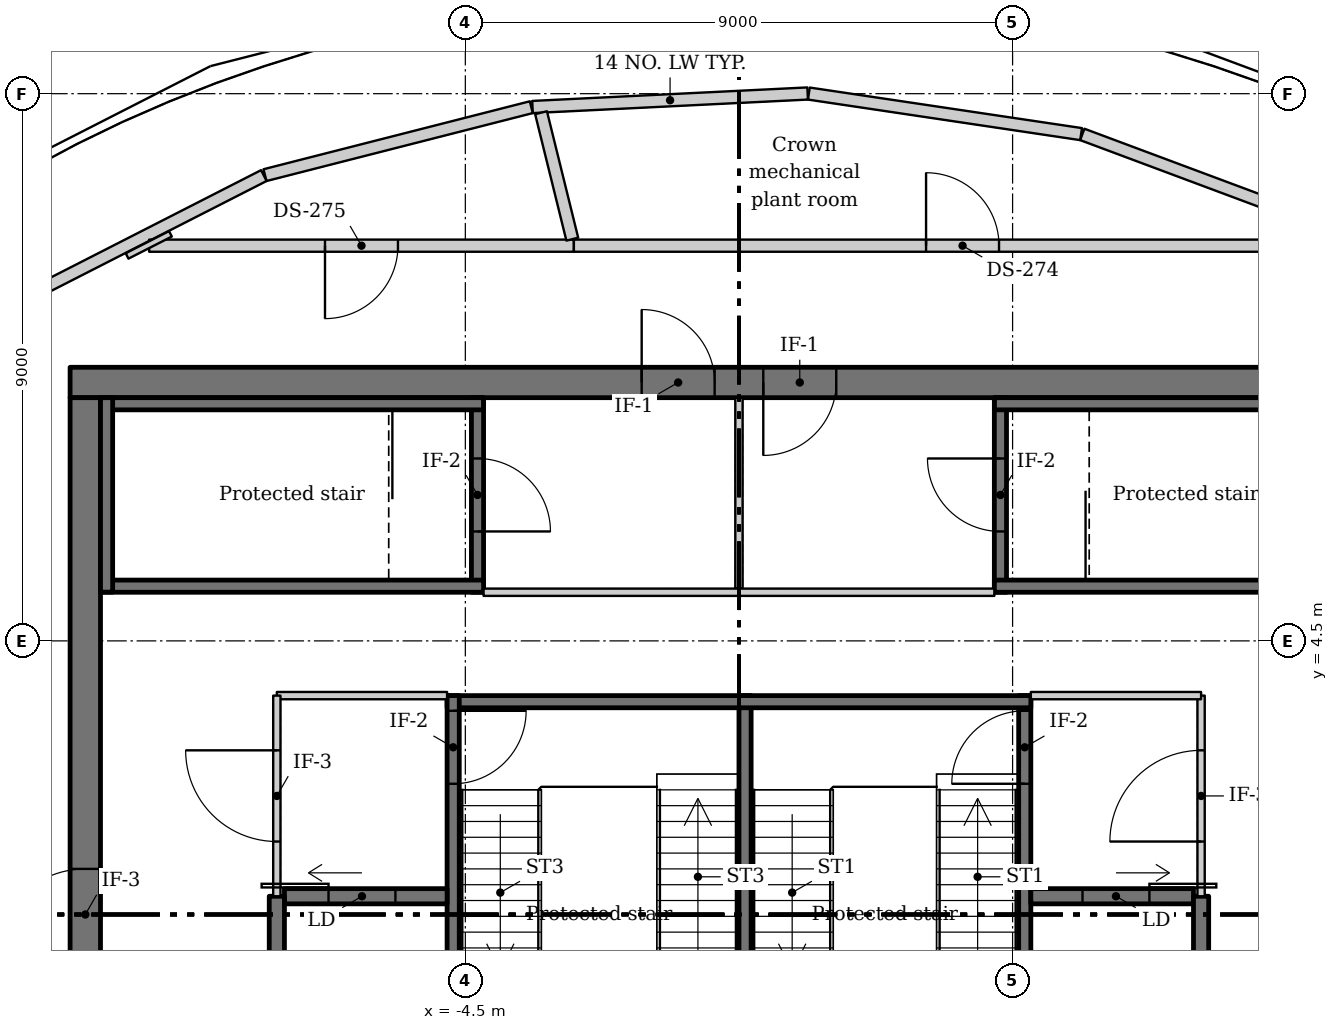
"""IFC4 building model, lengths in metres.
Left out: names, types, materials, properties, quantities, classifications, styles, units other than length and angle.
Written with IfcOpenShell. Run it as: python <this file> out.ifc"""

import sys

from ifc_helpers import new_model, si_unit, direction, frame, frame_2d, origin, place, context, subcontext, project, spatial, rectangle, extrude, source, transform, mapped, element, fill, save


model = new_model("IFC4")
c1 = context("Model", 3, precision=1e-05, world=origin(), true_north=direction((0.0, 1.0)))
c2 = subcontext(c1, "Body", "Model", "MODEL_VIEW")
j1 = project(units=[si_unit("LENGTHUNIT", "METRE"), si_unit("PLANEANGLEUNIT", "RADIAN")], contexts=[c1])
p1 = place(None, origin())
s1 = spatial("IfcSite", under=j1, at=p1, CompositionType="ELEMENT")
p2 = place(p1, origin())
s2 = spatial("IfcBuilding", under=s1, at=p2, CompositionType="ELEMENT")
p3 = place(p2, frame((0.0, 0.0, 352.0)))
s3 = spatial("IfcBuildingStorey", under=s2, at=p3, CompositionType="ELEMENT", Elevation=352.0)
m1 = source(origin(), c2, "Body", "SweptSolid", [
    extrude(rectangle(XDim=22.0, YDim=0.5, at=frame_2d((11.0, 0.0))), origin(), (0.0, 0.0, 1.0), 4.25),
])
p4 = place(p3, frame((-11.0, 8.75, -0.25), z_axis=(0.0, 0.0, 1.0), x_axis=(1.0, 0.0, 0.0)))
e1 = element("IfcWall", 1, at=p4, inside=s3, PredefinedType="SHEAR", context=c2, shape_type="MappedRepresentation", body=[
    mapped(m1, transform((0.0, 0.0, 0.0))),
])
m2 = source(origin(), c2, "Body", "SweptSolid", [
    extrude(rectangle(XDim=1.2, YDim=2.1, at=frame_2d((0.6, 1.05))), frame((0.0, 0.26, 0.0), z_axis=(0.0, -1.0, 0.0), x_axis=(1.0, 0.0, 0.0)), (0.0, 0.0, 1.0), 0.52),
])
p5 = place(p4, frame((9.4, 0.0, 0.25)))
e2 = element("IfcOpeningElement", 2, at=p5, cuts=e1, PredefinedType="OPENING", context=c2, shape_type="MappedRepresentation", body=[
    mapped(m2, transform((0.0, 0.0, 0.0))),
])
p6 = place(p4, frame((11.4, 0.0, 0.25)))
e3 = element("IfcOpeningElement", 3, at=p6, cuts=e1, PredefinedType="OPENING", context=c2, shape_type="MappedRepresentation", body=[
    mapped(m2, transform((0.0, 0.0, 0.0))),
])
m3 = source(origin(), c2, "Body", "SweptSolid", [
    extrude(rectangle(XDim=17.0, YDim=0.5, at=frame_2d((8.5, 0.0))), origin(), (0.0, 0.0, 1.0), 4.25),
])
p7 = place(p3, frame((-10.75, -8.5, -0.25), z_axis=(0.0, 0.0, 1.0), x_axis=(0.0, 1.0, 0.0)))
e4 = element("IfcWall", 4, at=p7, inside=s3, PredefinedType="SHEAR", context=c2, shape_type="MappedRepresentation", body=[
    mapped(m3, transform((0.0, 0.0, 0.0))),
])
m4 = source(origin(), c2, "Body", "SweptSolid", [
    extrude(rectangle(XDim=1.5, YDim=2.1, at=frame_2d((0.75, 1.05))), frame((0.0, 0.26, 0.0), z_axis=(0.0, -1.0, 0.0), x_axis=(1.0, 0.0, 0.0)), (0.0, 0.0, 1.0), 0.52),
])
p8 = place(p7, frame((7.75, 0.0, 0.25)))
e5 = element("IfcOpeningElement", 5, at=p8, cuts=e4, PredefinedType="OPENING", context=c2, shape_type="MappedRepresentation", body=[
    mapped(m4, transform((0.0, 0.0, 0.0))),
])
m5 = source(origin(), c2, "Body", "SweptSolid", [
    extrude(rectangle(XDim=4.51, YDim=0.2, at=frame_2d((2.255, 0.0))), origin(), (0.0, 0.0, 1.0), 4.0),
])
p9 = place(p3, frame((5.646, 12.83, 0.0), z_axis=(0.0, 0.0, 1.0), x_axis=(0.936857596237, -0.349711087004, 0.0)))
e6 = element("IfcWall", 6, at=p9, inside=s3, PredefinedType="SOLIDWALL", context=c2, shape_type="MappedRepresentation", body=[
    mapped(m5, transform((0.0, 0.0, 0.0))),
])
m6 = source(origin(), c2, "Body", "SweptSolid", [
    extrude(rectangle(XDim=4.527, YDim=0.2, at=frame_2d((2.263, 0.0))), origin(), (0.0, 0.0, 1.0), 4.0),
])
p10 = place(p3, frame((1.149, 13.502, 0.0), z_axis=(0.0, 0.0, 1.0), x_axis=(0.98908499412, -0.147346104146, 0.0)))
e7 = element("IfcWall", 7, at=p10, inside=s3, PredefinedType="SOLIDWALL", context=c2, shape_type="MappedRepresentation", body=[
    mapped(m6, transform((0.0, 0.0, 0.0))),
])
m7 = source(origin(), c2, "Body", "SweptSolid", [
    extrude(rectangle(XDim=4.53, YDim=0.2, at=frame_2d((2.265, 0.0))), origin(), (0.0, 0.0, 1.0), 4.0),
])
p11 = place(p3, frame((-3.396, 13.281, 0.0), z_axis=(0.0, 0.0, 1.0), x_axis=(0.998794180323, 0.049093638625, 0.0)))
e8 = element("IfcWall", 8, at=p11, inside=s3, PredefinedType="SOLIDWALL", context=c2, shape_type="MappedRepresentation", body=[
    mapped(m7, transform((0.0, 0.0, 0.0))),
])
m8 = source(origin(), c2, "Body", "SweptSolid", [
    extrude(rectangle(XDim=4.52, YDim=0.2, at=frame_2d((2.26, 0.0))), origin(), (0.0, 0.0, 1.0), 4.0),
])
p12 = place(p3, frame((-7.795, 12.16, 0.0), z_axis=(0.0, 0.0, 1.0), x_axis=(0.968962042594, 0.247209546764, 0.0)))
e9 = element("IfcWall", 9, at=p12, inside=s3, PredefinedType="SOLIDWALL", context=c2, shape_type="MappedRepresentation", body=[
    mapped(m8, transform((0.0, 0.0, 0.0))),
])
m9 = source(origin(), c2, "Body", "SweptSolid", [
    extrude(rectangle(XDim=4.494, YDim=0.2, at=frame_2d((2.247, 0.0))), origin(), (0.0, 0.0, 1.0), 4.0),
])
p13 = place(p3, frame((-11.816, 10.11, 0.0), z_axis=(0.0, 0.0, 1.0), x_axis=(0.890680163356, 0.45463045059, 0.0)))
e10 = element("IfcWall", 10, at=p13, inside=s3, PredefinedType="SOLIDWALL", context=c2, shape_type="MappedRepresentation", body=[
    mapped(m9, transform((0.0, 0.0, 0.0))),
])
m10 = source(origin(), c2, "Body", "SweptSolid", [
    extrude(rectangle(XDim=7.2, YDim=0.2, at=frame_2d((3.6, 0.0))), origin(), (0.0, 0.0, 1.0), 4.0),
])
p14 = place(p3, frame((0.1, 3.6, 0.0), z_axis=(0.0, 0.0, 1.0), x_axis=(0.0, -1.0, 0.0)))
e11 = element("IfcWall", 11, at=p14, inside=s3, PredefinedType="SHEAR", context=c2, shape_type="MappedRepresentation", body=[
    mapped(m10, transform((0.0, 0.0, 0.0))),
])
p15 = place(p3, frame((4.7, -3.6, 0.0), z_axis=(0.0, 0.0, 1.0), x_axis=(0.0, 1.0, 0.0)))
e12 = element("IfcWall", 12, at=p15, inside=s3, PredefinedType="SHEAR", context=c2, shape_type="MappedRepresentation", body=[
    mapped(m10, transform((0.0, 0.0, 0.0))),
])
m11 = source(origin(), c2, "Body", "SweptSolid", [
    extrude(rectangle(XDim=1.2, YDim=2.1, at=frame_2d((0.6, 1.05))), frame((0.0, 0.11, 0.0), z_axis=(0.0, -1.0, 0.0), x_axis=(1.0, 0.0, 0.0)), (0.0, 0.0, 1.0), 0.22),
])
p16 = place(p15, frame((5.75, 0.0, 0.0)))
e13 = element("IfcOpeningElement", 13, at=p16, cuts=e12, PredefinedType="OPENING", context=c2, shape_type="MappedRepresentation", body=[
    mapped(m11, transform((0.0, 0.0, 0.0))),
])
m12 = source(origin(), c2, "Body", "SweptSolid", [
    extrude(rectangle(XDim=9.6, YDim=0.2, at=frame_2d((4.8, 0.0))), origin(), (0.0, 0.0, 1.0), 4.0),
])
p17 = place(p3, frame((4.8, 3.5, 0.0), z_axis=(0.0, 0.0, 1.0), x_axis=(-1.0, 0.0, 0.0)))
e14 = element("IfcWall", 14, at=p17, inside=s3, PredefinedType="SHEAR", context=c2, shape_type="MappedRepresentation", body=[
    mapped(m12, transform((0.0, 0.0, 0.0))),
])
p18 = place(p3, frame((-4.7, 3.6, 0.0), z_axis=(0.0, 0.0, 1.0), x_axis=(0.0, -1.0, 0.0)))
e15 = element("IfcWall", 15, at=p18, inside=s3, PredefinedType="SHEAR", context=c2, shape_type="MappedRepresentation", body=[
    mapped(m10, transform((0.0, 0.0, 0.0))),
])
p19 = place(p18, frame((0.25, 0.0, 0.0)))
e16 = element("IfcOpeningElement", 16, at=p19, cuts=e15, PredefinedType="OPENING", context=c2, shape_type="MappedRepresentation", body=[
    mapped(m11, transform((0.0, 0.0, 0.0))),
])
m13 = source(origin(), c2, "Body", "SweptSolid", [
    extrude(rectangle(XDim=2.675, YDim=0.25, at=frame_2d((1.337, 0.0))), origin(), (0.0, 0.0, 1.0), 4.0),
])
p20 = place(p3, frame((7.475, 0.3, 0.0), z_axis=(0.0, 0.0, 1.0), x_axis=(-1.0, 0.0, 0.0)))
e17 = element("IfcWall", 17, at=p20, inside=s3, PredefinedType="SHEAR", context=c2, shape_type="MappedRepresentation", body=[
    mapped(m13, transform((0.0, 0.0, 0.0))),
])
m14 = source(origin(), c2, "Body", "SweptSolid", [
    extrude(rectangle(XDim=1.1, YDim=2.1, at=frame_2d((0.55, 1.05))), frame((0.0, 0.135, 0.0), z_axis=(0.0, -1.0, 0.0), x_axis=(1.0, 0.0, 0.0)), (0.0, 0.0, 1.0), 0.27),
])
p21 = place(p20, frame((0.725, 0.0, 0.0)))
e18 = element("IfcOpeningElement", 18, at=p21, cuts=e17, PredefinedType="OPENING", context=c2, shape_type="MappedRepresentation", body=[
    mapped(m14, transform((0.0, 0.0, 0.0))),
])
m15 = source(origin(), c2, "Body", "SweptSolid", [
    extrude(rectangle(XDim=3.9, YDim=0.25, at=frame_2d((1.95, 0.0))), origin(), (0.0, 0.0, 1.0), 4.0),
])
p22 = place(p3, frame((7.6, -3.6, 0.0), z_axis=(0.0, 0.0, 1.0), x_axis=(0.0, 1.0, 0.0)))
e19 = element("IfcWall", 19, at=p22, inside=s3, PredefinedType="SHEAR", context=c2, shape_type="MappedRepresentation", body=[
    mapped(m15, transform((0.0, 0.0, 0.0))),
])
m16 = source(origin(), c2, "Body", "SweptSolid", [
    extrude(rectangle(XDim=3.3, YDim=0.12, at=frame_2d((1.65, 0.0))), origin(), (0.0, 0.0, 1.0), 3.5),
])
p23 = place(p3, frame((7.6, 0.3, 0.0), z_axis=(0.0, 0.0, 1.0), x_axis=(0.0, 1.0, 0.0)))
e20 = element("IfcWall", 20, at=p23, inside=s3, PredefinedType="PARTITIONING", context=c2, shape_type="MappedRepresentation", body=[
    mapped(m16, transform((0.0, 0.0, 0.0))),
])
m17 = source(origin(), c2, "Body", "SweptSolid", [
    extrude(rectangle(XDim=1.5, YDim=2.1, at=frame_2d((0.75, 1.05))), frame((0.0, 0.07, 0.0), z_axis=(0.0, -1.0, 0.0), x_axis=(1.0, 0.0, 0.0)), (0.0, 0.0, 1.0), 0.14),
])
p24 = place(p23, frame((0.9, 0.0, 0.0)))
e21 = element("IfcOpeningElement", 21, at=p24, cuts=e20, PredefinedType="OPENING", context=c2, shape_type="MappedRepresentation", body=[
    mapped(m17, transform((0.0, 0.0, 0.0))),
])
m18 = source(origin(), c2, "Body", "SweptSolid", [
    extrude(rectangle(XDim=2.8, YDim=0.12, at=frame_2d((1.4, 0.0))), origin(), (0.0, 0.0, 1.0), 3.5),
])
p25 = place(p3, frame((7.6, 3.6, 0.0), z_axis=(0.0, 0.0, 1.0), x_axis=(-1.0, 0.0, 0.0)))
e22 = element("IfcWall", 22, at=p25, inside=s3, PredefinedType="PARTITIONING", context=c2, shape_type="MappedRepresentation", body=[
    mapped(m18, transform((0.0, 0.0, 0.0))),
])
p26 = place(p3, frame((-4.8, 0.3, 0.0), z_axis=(0.0, 0.0, 1.0), x_axis=(-1.0, 0.0, 0.0)))
e23 = element("IfcWall", 23, at=p26, inside=s3, PredefinedType="SHEAR", context=c2, shape_type="MappedRepresentation", body=[
    mapped(m13, transform((0.0, 0.0, 0.0))),
])
p27 = place(p26, frame((0.85, 0.0, 0.0)))
e24 = element("IfcOpeningElement", 24, at=p27, cuts=e23, PredefinedType="OPENING", context=c2, shape_type="MappedRepresentation", body=[
    mapped(m14, transform((0.0, 0.0, 0.0))),
])
p28 = place(p3, frame((-7.6, 0.3, 0.0), z_axis=(0.0, 0.0, 1.0), x_axis=(0.0, -1.0, 0.0)))
e25 = element("IfcWall", 25, at=p28, inside=s3, PredefinedType="SHEAR", context=c2, shape_type="MappedRepresentation", body=[
    mapped(m15, transform((0.0, 0.0, 0.0))),
])
p29 = place(p3, frame((-4.8, 3.6, 0.0), z_axis=(0.0, 0.0, 1.0), x_axis=(-1.0, 0.0, 0.0)))
e26 = element("IfcWall", 26, at=p29, inside=s3, PredefinedType="PARTITIONING", context=c2, shape_type="MappedRepresentation", body=[
    mapped(m18, transform((0.0, 0.0, 0.0))),
])
p30 = place(p3, frame((-7.6, 3.6, 0.0), z_axis=(0.0, 0.0, 1.0), x_axis=(0.0, -1.0, 0.0)))
e27 = element("IfcWall", 27, at=p30, inside=s3, PredefinedType="PARTITIONING", context=c2, shape_type="MappedRepresentation", body=[
    mapped(m16, transform((0.0, 0.0, 0.0))),
])
p31 = place(p30, frame((0.9, 0.0, 0.0)))
e28 = element("IfcOpeningElement", 28, at=p31, cuts=e27, PredefinedType="OPENING", context=c2, shape_type="MappedRepresentation", body=[
    mapped(m17, transform((0.0, 0.0, 0.0))),
])
m19 = source(origin(), c2, "Body", "SweptSolid", [
    extrude(rectangle(XDim=3.2, YDim=0.2, at=frame_2d((1.6, 0.0))), origin(), (0.0, 0.0, 1.0), 4.0),
])
p32 = place(p3, frame((-4.3, 5.3, 0.0), z_axis=(0.0, 0.0, 1.0), x_axis=(0.0, 1.0, 0.0)))
e29 = element("IfcWall", 29, at=p32, inside=s3, PredefinedType="SHEAR", context=c2, shape_type="MappedRepresentation", body=[
    mapped(m19, transform((0.0, 0.0, 0.0))),
])
p33 = place(p32, frame((1.0, 0.0, 0.0)))
e30 = element("IfcOpeningElement", 30, at=p33, cuts=e29, PredefinedType="OPENING", context=c2, shape_type="MappedRepresentation", body=[
    mapped(m11, transform((0.0, 0.0, 0.0))),
])
m20 = source(origin(), c2, "Body", "SweptSolid", [
    extrude(rectangle(XDim=6.3, YDim=0.2, at=frame_2d((3.15, 0.0))), origin(), (0.0, 0.0, 1.0), 4.0),
])
p34 = place(p3, frame((-10.5, 5.4, 0.0), z_axis=(0.0, 0.0, 1.0), x_axis=(1.0, 0.0, 0.0)))
e31 = element("IfcWall", 31, at=p34, inside=s3, PredefinedType="SHEAR", context=c2, shape_type="MappedRepresentation", body=[
    mapped(m20, transform((0.0, 0.0, 0.0))),
])
m21 = source(origin(), c2, "Body", "SweptSolid", [
    extrude(rectangle(XDim=3.14, YDim=0.12, at=frame_2d((1.57, 0.0))), origin(), (0.0, 0.0, 1.0), 3.5),
])
p35 = place(p3, frame((0.0, 5.36, 0.0), z_axis=(0.0, 0.0, 1.0), x_axis=(0.0, 1.0, 0.0)))
e32 = element("IfcWall", 32, at=p35, inside=s3, PredefinedType="PARTITIONING", context=c2, shape_type="MappedRepresentation", body=[
    mapped(m21, transform((0.0, 0.0, 0.0))),
])
m22 = source(origin(), c2, "Body", "SweptSolid", [
    extrude(rectangle(XDim=8.4, YDim=0.12, at=frame_2d((4.2, 0.0))), origin(), (0.0, 0.0, 1.0), 3.5),
])
p36 = place(p3, frame((-4.2, 5.3, 0.0), z_axis=(0.0, 0.0, 1.0), x_axis=(1.0, 0.0, 0.0)))
e33 = element("IfcWall", 33, at=p36, inside=s3, PredefinedType="PARTITIONING", context=c2, shape_type="MappedRepresentation", body=[
    mapped(m22, transform((0.0, 0.0, 0.0))),
])
p37 = place(p3, frame((4.3, 8.5, 0.0), z_axis=(0.0, 0.0, 1.0), x_axis=(0.0, -1.0, 0.0)))
e34 = element("IfcWall", 34, at=p37, inside=s3, PredefinedType="SHEAR", context=c2, shape_type="MappedRepresentation", body=[
    mapped(m19, transform((0.0, 0.0, 0.0))),
])
p38 = place(p37, frame((1.0, 0.0, 0.0)))
e35 = element("IfcOpeningElement", 35, at=p38, cuts=e34, PredefinedType="OPENING", context=c2, shape_type="MappedRepresentation", body=[
    mapped(m11, transform((0.0, 0.0, 0.0))),
])
p39 = place(p3, frame((4.2, 5.4, 0.0), z_axis=(0.0, 0.0, 1.0), x_axis=(1.0, 0.0, 0.0)))
e36 = element("IfcWall", 36, at=p39, inside=s3, PredefinedType="SHEAR", context=c2, shape_type="MappedRepresentation", body=[
    mapped(m20, transform((0.0, 0.0, 0.0))),
])
m23 = source(origin(), c2, "Body", "SweptSolid", [
    extrude(rectangle(XDim=6.298, YDim=0.2, at=frame_2d((3.149, 0.0))), origin(), (0.0, 0.0, 1.0), 4.0),
])
p40 = place(p3, frame((-4.202, 8.4, 0.0), z_axis=(0.0, 0.0, 1.0), x_axis=(-1.0, 0.0, 0.0)))
e37 = element("IfcWall", 37, at=p40, inside=s3, PredefinedType="SHEAR", context=c2, shape_type="MappedRepresentation", body=[
    mapped(m23, transform((0.0, 0.0, 0.0))),
])
m24 = source(origin(), c2, "Body", "SweptSolid", [
    extrude(rectangle(XDim=3.198, YDim=0.2, at=frame_2d((1.599, 0.0))), origin(), (0.0, 0.0, 1.0), 4.0),
])
p41 = place(p3, frame((-10.4, 8.5, 0.0), z_axis=(0.0, 0.0, 1.0), x_axis=(0.0, -1.0, 0.0)))
e38 = element("IfcWall", 38, at=p41, inside=s3, PredefinedType="SHEAR", context=c2, shape_type="MappedRepresentation", body=[
    mapped(m24, transform((0.0, 0.0, 0.0))),
])
p42 = place(p3, frame((10.5, 8.4, 0.0), z_axis=(0.0, 0.0, 1.0), x_axis=(-1.0, 0.0, 0.0)))
e39 = element("IfcWall", 39, at=p42, inside=s3, PredefinedType="SHEAR", context=c2, shape_type="MappedRepresentation", body=[
    mapped(m23, transform((0.0, 0.0, 0.0))),
])
m25 = source(origin(), c2, "Body", "SweptSolid", [
    extrude(rectangle(XDim=6.985, YDim=0.2, at=frame_2d((3.492, 0.0))), origin(), (0.0, 0.0, 1.0), 4.0),
])
p43 = place(p3, frame((-9.7, 11.0, 0.0), z_axis=(0.0, 0.0, 1.0), x_axis=(1.0, 0.0, 0.0)))
e40 = element("IfcWall", 40, at=p43, inside=s3, PredefinedType="PARTITIONING", context=c2, shape_type="MappedRepresentation", body=[
    mapped(m25, transform((0.0, 0.0, 0.0))),
])
p44 = place(p43, frame((2.892, 0.0, 0.0)))
e41 = element("IfcOpeningElement", 41, at=p44, cuts=e40, PredefinedType="OPENING", context=c2, shape_type="MappedRepresentation", body=[
    mapped(m11, transform((0.0, 0.0, 0.0))),
])
m26 = source(origin(), c2, "Body", "SweptSolid", [
    extrude(rectangle(XDim=2.143, YDim=0.2, at=frame_2d((1.071, 0.0))), origin(), (0.0, 0.0, 1.0), 4.0),
])
p45 = place(p3, frame((-2.741, 11.107, 0.0), z_axis=(0.0, 0.0, 1.0), x_axis=(-0.239853646519, 0.970809058596, 0.0)))
e42 = element("IfcWall", 42, at=p45, inside=s3, PredefinedType="PARTITIONING", context=c2, shape_type="MappedRepresentation", body=[
    mapped(m26, transform((0.0, 0.0, 0.0))),
])
m27 = source(origin(), c2, "Body", "SweptSolid", [
    extrude(rectangle(XDim=12.784, YDim=0.2, at=frame_2d((6.392, 0.0))), origin(), (0.0, 0.0, 1.0), 4.0),
])
p46 = place(p3, frame((-2.715, 11.0, 0.0), z_axis=(0.0, 0.0, 1.0), x_axis=(1.0, 0.0, 0.0)))
e43 = element("IfcWall", 43, at=p46, inside=s3, PredefinedType="PARTITIONING", context=c2, shape_type="MappedRepresentation", body=[
    mapped(m27, transform((0.0, 0.0, 0.0))),
])
p47 = place(p46, frame((5.792, 0.0, 0.0)))
e44 = element("IfcOpeningElement", 44, at=p47, cuts=e43, PredefinedType="OPENING", context=c2, shape_type="MappedRepresentation", body=[
    mapped(m11, transform((0.0, 0.0, 0.0))),
])
m28 = source(origin(), c2, "Body", "SweptSolid", [
    extrude(rectangle(XDim=0.801, YDim=0.1, at=frame_2d((0.4, 0.0))), origin(), (0.0, 0.0, 1.0), 4.0),
])
p48 = place(p3, frame((-10.063, 10.831, 0.0), z_axis=(0.0, 0.0, 1.0), x_axis=(0.890613149989, 0.454761714601, 0.0)))
e45 = element("IfcWall", 45, at=p48, inside=s3, PredefinedType="PARTITIONING", context=c2, shape_type="MappedRepresentation", body=[
    mapped(m28, transform((0.0, 0.0, 0.0))),
])
m29 = source(origin(), c2, "Body", "SweptSolid", [
    extrude(rectangle(XDim=1.1, YDim=2.1, at=frame_2d((0.55, 1.05))), frame((0.0, 0.025, 0.0), z_axis=(0.0, -1.0, 0.0), x_axis=(1.0, 0.0, 0.0)), (0.0, 0.0, 1.0), 0.05),
])
p49 = place(p21, origin())
e46 = element("IfcDoor", 46, at=p49, inside=s3, OperationType="SLIDING_TO_LEFT", PredefinedType="DOOR", context=c2, shape_type="MappedRepresentation", body=[
    mapped(m29, transform((0.0, 0.0, 0.0))),
])
fill(e18, e46)
m30 = source(origin(), c2, "Body", "SweptSolid", [
    extrude(rectangle(XDim=1.2, YDim=2.1, at=frame_2d((0.6, 1.05))), frame((0.0, 0.025, 0.0), z_axis=(0.0, -1.0, 0.0), x_axis=(1.0, 0.0, 0.0)), (0.0, 0.0, 1.0), 0.05),
])
p50 = place(p16, origin())
e47 = element("IfcDoor", 47, at=p50, inside=s3, OperationType="SINGLE_SWING_RIGHT", PredefinedType="DOOR", context=c2, shape_type="MappedRepresentation", body=[
    mapped(m30, transform((0.0, 0.0, 0.0))),
])
fill(e13, e47)
p51 = place(p27, origin())
e48 = element("IfcDoor", 48, at=p51, inside=s3, OperationType="SLIDING_TO_RIGHT", PredefinedType="DOOR", context=c2, shape_type="MappedRepresentation", body=[
    mapped(m29, transform((0.0, 0.0, 0.0))),
])
fill(e24, e48)
p52 = place(p19, origin())
e49 = element("IfcDoor", 49, at=p52, inside=s3, OperationType="SINGLE_SWING_RIGHT", PredefinedType="DOOR", context=c2, shape_type="MappedRepresentation", body=[
    mapped(m30, transform((0.0, 0.0, 0.0))),
])
fill(e16, e49)
p53 = place(p33, origin())
e50 = element("IfcDoor", 50, at=p53, inside=s3, OperationType="SINGLE_SWING_RIGHT", PredefinedType="DOOR", context=c2, shape_type="MappedRepresentation", body=[
    mapped(m30, transform((0.0, 0.0, 0.0))),
])
fill(e30, e50)
p54 = place(p5, origin())
e51 = element("IfcDoor", 51, at=p54, inside=s3, OperationType="SINGLE_SWING_LEFT", PredefinedType="DOOR", context=c2, shape_type="MappedRepresentation", body=[
    mapped(m30, transform((0.0, 0.0, 0.0))),
])
fill(e2, e51)
p55 = place(p38, origin())
e52 = element("IfcDoor", 52, at=p55, inside=s3, OperationType="SINGLE_SWING_LEFT", PredefinedType="DOOR", context=c2, shape_type="MappedRepresentation", body=[
    mapped(m30, transform((0.0, 0.0, 0.0))),
])
fill(e35, e52)
p56 = place(p6, origin())
e53 = element("IfcDoor", 53, at=p56, inside=s3, OperationType="SINGLE_SWING_RIGHT", PredefinedType="DOOR", context=c2, shape_type="MappedRepresentation", body=[
    mapped(m30, transform((0.0, 0.0, 0.0))),
])
fill(e3, e53)
m31 = source(origin(), c2, "Body", "SweptSolid", [
    extrude(rectangle(XDim=1.5, YDim=2.1, at=frame_2d((0.75, 1.05))), frame((0.0, 0.025, 0.0), z_axis=(0.0, -1.0, 0.0), x_axis=(1.0, 0.0, 0.0)), (0.0, 0.0, 1.0), 0.05),
])
p57 = place(p8, origin())
e54 = element("IfcDoor", 54, at=p57, inside=s3, OperationType="DOUBLE_DOOR_SINGLE_SWING", PredefinedType="DOOR", context=c2, shape_type="MappedRepresentation", body=[
    mapped(m31, transform((0.0, 0.0, 0.0))),
])
fill(e5, e54)
p58 = place(p24, origin())
e55 = element("IfcDoor", 55, at=p58, inside=s3, OperationType="DOUBLE_DOOR_SINGLE_SWING", PredefinedType="DOOR", context=c2, shape_type="MappedRepresentation", body=[
    mapped(m31, transform((0.0, 0.0, 0.0))),
])
fill(e21, e55)
p59 = place(p31, origin())
e56 = element("IfcDoor", 56, at=p59, inside=s3, OperationType="DOUBLE_DOOR_SINGLE_SWING", PredefinedType="DOOR", context=c2, shape_type="MappedRepresentation", body=[
    mapped(m31, transform((0.0, 0.0, 0.0))),
])
fill(e28, e56)
m32 = source(origin(), c2, "Body", "SweptSolid", [
    extrude(rectangle(XDim=1.2, YDim=2.1, at=frame_2d((0.6, 1.05))), frame((0.0, 0.025, 0.0), z_axis=(0.0, -1.0, 0.0), x_axis=(1.0, 0.0, 0.0)), (0.0, 0.0, 1.0), 0.05),
])
p60 = place(p47, origin())
e57 = element("IfcDoor", 57, at=p60, inside=s3, OperationType="SINGLE_SWING_LEFT", PredefinedType="DOOR", context=c2, shape_type="MappedRepresentation", body=[
    mapped(m32, transform((0.0, 0.0, 0.0))),
])
fill(e44, e57)
p61 = place(p44, origin())
e58 = element("IfcDoor", 58, at=p61, inside=s3, OperationType="SINGLE_SWING_LEFT", PredefinedType="DOOR", context=c2, shape_type="MappedRepresentation", body=[
    mapped(m32, transform((0.0, 0.0, 0.0))),
])
fill(e41, e58)
save(model, sys.argv[1])
